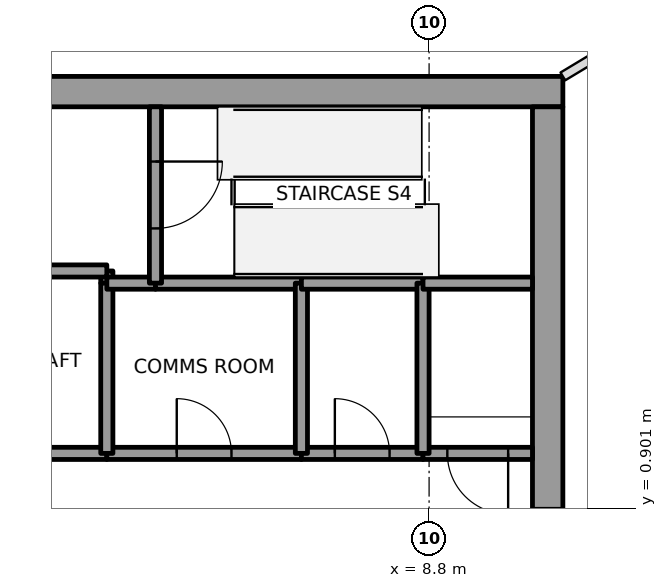
"""IFC4 building model, lengths in metres.
Left out: names, types, materials, properties, quantities, classifications, styles, units other than length and angle.
Written with IfcOpenShell. Run it as: python <this file> out.ifc"""

import sys

from ifc_helpers import new_model, si_unit, direction, frame, frame_2d, origin, place, context, subcontext, project, spatial, rectangle, extrude, element, fill, save


model = new_model("IFC4")
c1 = context("Model", 3, precision=1e-05, world=origin(), true_north=direction((0.0, 1.0)))
c2 = subcontext(c1, "Body", "Model", "MODEL_VIEW")
j1 = project(units=[si_unit("LENGTHUNIT", "METRE"), si_unit("PLANEANGLEUNIT", "RADIAN")], contexts=[c1])
p1 = place(None, origin())
s1 = spatial("IfcSite", under=j1, at=p1, CompositionType="ELEMENT")
p2 = place(p1, origin())
s2 = spatial("IfcBuilding", under=s1, at=p2, CompositionType="ELEMENT")
p3 = place(p2, frame((0.0, 0.0, 291.0)))
s3 = spatial("IfcBuildingStorey", under=s2, at=p3, CompositionType="ELEMENT", Elevation=291.0)
p4 = place(p3, frame((-11.0, 7.75, 0.0), z_axis=(0.0, 0.0, 1.0), x_axis=(1.0, 0.0, 0.0)))
e1 = element("IfcWall", 1, at=p4, inside=s3, PredefinedType="SHEAR", context=c2, shape_type="SweptSolid", body=[
    extrude(rectangle(XDim=22.0, YDim=0.5, at=frame_2d((11.0, 0.0))), origin(), (0.0, 0.0, 1.0), 4.0),
])
p5 = place(p4, frame((10.45, 0.0, 0.0)))
e2 = element("IfcOpeningElement", 2, at=p5, cuts=e1, PredefinedType="OPENING", context=c2, shape_type="SweptSolid", body=[
    extrude(rectangle(XDim=1.1, YDim=2.1, at=frame_2d((0.55, 1.05))), frame((0.0, 0.25, 0.0), z_axis=(0.0, -1.0, 0.0), x_axis=(1.0, 0.0, 0.0)), (0.0, 0.0, 1.0), 0.5),
])
p6 = place(p3, frame((10.75, -7.5, 0.0), z_axis=(0.0, 0.0, 1.0), x_axis=(0.0, 1.0, 0.0)))
e3 = element("IfcWall", 3, at=p6, inside=s3, PredefinedType="SHEAR", context=c2, shape_type="SweptSolid", body=[
    extrude(rectangle(XDim=15.0, YDim=0.5, at=frame_2d((7.5, 0.0))), origin(), (0.0, 0.0, 1.0), 4.0),
])
p7 = place(p6, frame((6.6, 0.0, 0.0)))
e4 = element("IfcOpeningElement", 4, at=p7, cuts=e3, PredefinedType="OPENING", context=c2, shape_type="SweptSolid", body=[
    extrude(rectangle(XDim=1.8, YDim=2.1, at=frame_2d((0.9, 1.05))), frame((0.0, 0.25, 0.0), z_axis=(0.0, -1.0, 0.0), x_axis=(1.0, 0.0, 0.0)), (0.0, 0.0, 1.0), 0.5),
])
p8 = place(p3, frame((12.153, 7.96, 0.0), z_axis=(0.0, 0.0, 1.0), x_axis=(-0.523170739685, 0.852227890378, 0.0)))
e5 = element("IfcWall", 5, at=p8, inside=s3, PredefinedType="SOLIDWALL", context=c2, shape_type="SweptSolid", body=[
    extrude(rectangle(XDim=3.808, YDim=0.2, at=frame_2d((1.904, 0.0))), origin(), (0.0, 0.0, 1.0), 3.34),
])
p9 = place(p8, frame((1.354, 0.0, 0.0)))
e6 = element("IfcOpeningElement", 6, at=p9, cuts=e5, PredefinedType="OPENING", context=c2, shape_type="SweptSolid", body=[
    extrude(rectangle(XDim=1.1, YDim=2.1, at=frame_2d((0.55, 1.05))), frame((0.0, 0.1, 0.0), z_axis=(0.0, -1.0, 0.0), x_axis=(1.0, 0.0, 0.0)), (0.0, 0.0, 1.0), 0.2),
])
p10 = place(p3, frame((3.5, 1.8, 0.0), z_axis=(0.0, 0.0, 1.0), x_axis=(-1.0, 0.0, 0.0)))
e7 = element("IfcWall", 7, at=p10, inside=s3, PredefinedType="SOLIDWALL", context=c2, shape_type="SweptSolid", body=[
    extrude(rectangle(XDim=2.6, YDim=0.2, at=frame_2d((1.3, 0.0))), origin(), (0.0, 0.0, 1.0), 3.85),
])
p11 = place(p3, frame((3.5, 4.6, 0.0), z_axis=(0.0, 0.0, 1.0), x_axis=(0.0, 1.0, 0.0)))
e8 = element("IfcWall", 8, at=p11, inside=s3, PredefinedType="SOLIDWALL", context=c2, shape_type="SweptSolid", body=[
    extrude(rectangle(XDim=0.2, YDim=0.2, at=frame_2d((0.1, 0.0))), origin(), (0.0, 0.0, 1.0), 3.85),
])
p12 = place(p3, frame((3.5, 4.8, 0.0), z_axis=(0.0, 0.0, 1.0), x_axis=(-1.0, 0.0, 0.0)))
e9 = element("IfcWall", 9, at=p12, inside=s3, PredefinedType="SOLIDWALL", context=c2, shape_type="SweptSolid", body=[
    extrude(rectangle(XDim=2.6, YDim=0.2, at=frame_2d((1.3, 0.0))), origin(), (0.0, 0.0, 1.0), 3.85),
])
p13 = place(p3, frame((3.5, 1.8, 0.0), z_axis=(0.0, 0.0, 1.0), x_axis=(1.0, 0.0, 0.0)))
e10 = element("IfcWall", 10, at=p13, inside=s3, PredefinedType="SOLIDWALL", context=c2, shape_type="SweptSolid", body=[
    extrude(rectangle(XDim=3.2, YDim=0.2, at=frame_2d((1.6, 0.0))), origin(), (0.0, 0.0, 1.0), 3.85),
])
p14 = place(p13, frame((1.15, 0.0, 0.0)))
e11 = element("IfcOpeningElement", 11, at=p14, cuts=e10, PredefinedType="OPENING", context=c2, shape_type="SweptSolid", body=[
    extrude(rectangle(XDim=0.9, YDim=2.1, at=frame_2d((0.45, 1.05))), frame((0.0, 0.1, 0.0), z_axis=(0.0, -1.0, 0.0), x_axis=(1.0, 0.0, 0.0)), (0.0, 0.0, 1.0), 0.2),
])
p15 = place(p3, frame((3.5, 4.6, 0.0), z_axis=(0.0, 0.0, 1.0), x_axis=(0.0, -1.0, 0.0)))
e12 = element("IfcWall", 12, at=p15, inside=s3, PredefinedType="SOLIDWALL", context=c2, shape_type="SweptSolid", body=[
    extrude(rectangle(XDim=2.8, YDim=0.2, at=frame_2d((1.4, 0.0))), origin(), (0.0, 0.0, 1.0), 3.85),
])
p16 = place(p3, frame((4.3, 4.6, 0.0), z_axis=(0.0, 0.0, 1.0), x_axis=(-1.0, 0.0, 0.0)))
e13 = element("IfcWall", 13, at=p16, inside=s3, PredefinedType="SOLIDWALL", context=c2, shape_type="SweptSolid", body=[
    extrude(rectangle(XDim=0.8, YDim=0.2, at=frame_2d((0.4, 0.0))), origin(), (0.0, 0.0, 1.0), 3.85),
])
p17 = place(p3, frame((6.7, 4.6, 0.0), z_axis=(0.0, 0.0, 1.0), x_axis=(-1.0, 0.0, 0.0)))
e14 = element("IfcWall", 14, at=p17, inside=s3, PredefinedType="SOLIDWALL", context=c2, shape_type="SweptSolid", body=[
    extrude(rectangle(XDim=2.4, YDim=0.2, at=frame_2d((1.2, 0.0))), origin(), (0.0, 0.0, 1.0), 3.85),
])
p18 = place(p3, frame((4.3, 7.5, 0.0), z_axis=(0.0, 0.0, 1.0), x_axis=(0.0, -1.0, 0.0)))
e15 = element("IfcWall", 15, at=p18, inside=s3, PredefinedType="SOLIDWALL", context=c2, shape_type="SweptSolid", body=[
    extrude(rectangle(XDim=2.9, YDim=0.2, at=frame_2d((1.45, 0.0))), origin(), (0.0, 0.0, 1.0), 3.85),
])
p19 = place(p18, frame((0.9, 0.0, 0.0)))
e16 = element("IfcOpeningElement", 16, at=p19, cuts=e15, PredefinedType="OPENING", context=c2, shape_type="SweptSolid", body=[
    extrude(rectangle(XDim=1.1, YDim=2.1, at=frame_2d((0.55, 1.05))), frame((0.0, 0.1, 0.0), z_axis=(0.0, -1.0, 0.0), x_axis=(1.0, 0.0, 0.0)), (0.0, 0.0, 1.0), 0.2),
])
p20 = place(p3, frame((6.7, 1.8, 0.0), z_axis=(0.0, 0.0, 1.0), x_axis=(1.0, 0.0, 0.0)))
e17 = element("IfcWall", 17, at=p20, inside=s3, PredefinedType="SOLIDWALL", context=c2, shape_type="SweptSolid", body=[
    extrude(rectangle(XDim=2.0, YDim=0.2, at=frame_2d((1.0, 0.0))), origin(), (0.0, 0.0, 1.0), 3.85),
])
p21 = place(p20, frame((0.55, 0.0, 0.0)))
e18 = element("IfcOpeningElement", 18, at=p21, cuts=e17, PredefinedType="OPENING", context=c2, shape_type="SweptSolid", body=[
    extrude(rectangle(XDim=0.9, YDim=2.1, at=frame_2d((0.45, 1.05))), frame((0.0, 0.1, 0.0), z_axis=(0.0, -1.0, 0.0), x_axis=(1.0, 0.0, 0.0)), (0.0, 0.0, 1.0), 0.2),
])
p22 = place(p3, frame((6.7, 1.8, 0.0), z_axis=(0.0, 0.0, 1.0), x_axis=(0.0, 1.0, 0.0)))
e19 = element("IfcWall", 19, at=p22, inside=s3, PredefinedType="SOLIDWALL", context=c2, shape_type="SweptSolid", body=[
    extrude(rectangle(XDim=2.8, YDim=0.2, at=frame_2d((1.4, 0.0))), origin(), (0.0, 0.0, 1.0), 3.85),
])
p23 = place(p3, frame((8.7, 4.6, 0.0), z_axis=(0.0, 0.0, 1.0), x_axis=(-1.0, 0.0, 0.0)))
e20 = element("IfcWall", 20, at=p23, inside=s3, PredefinedType="SOLIDWALL", context=c2, shape_type="SweptSolid", body=[
    extrude(rectangle(XDim=2.0, YDim=0.2, at=frame_2d((1.0, 0.0))), origin(), (0.0, 0.0, 1.0), 3.85),
])
p24 = place(p3, frame((10.5, 1.8, 0.0), z_axis=(0.0, 0.0, 1.0), x_axis=(-1.0, 0.0, 0.0)))
e21 = element("IfcWall", 21, at=p24, inside=s3, PredefinedType="SOLIDWALL", context=c2, shape_type="SweptSolid", body=[
    extrude(rectangle(XDim=1.8, YDim=0.2, at=frame_2d((0.9, 0.0))), origin(), (0.0, 0.0, 1.0), 3.85),
])
p25 = place(p24, frame((0.4, 0.0, 0.0)))
e22 = element("IfcOpeningElement", 22, at=p25, cuts=e21, PredefinedType="OPENING", context=c2, shape_type="SweptSolid", body=[
    extrude(rectangle(XDim=1.0, YDim=2.1, at=frame_2d((0.5, 1.05))), frame((0.0, 0.1, 0.0), z_axis=(0.0, -1.0, 0.0), x_axis=(1.0, 0.0, 0.0)), (0.0, 0.0, 1.0), 0.2),
])
p26 = place(p3, frame((8.7, 1.8, 0.0), z_axis=(0.0, 0.0, 1.0), x_axis=(0.0, 1.0, 0.0)))
e23 = element("IfcWall", 23, at=p26, inside=s3, PredefinedType="SOLIDWALL", context=c2, shape_type="SweptSolid", body=[
    extrude(rectangle(XDim=2.8, YDim=0.2, at=frame_2d((1.4, 0.0))), origin(), (0.0, 0.0, 1.0), 3.85),
])
p27 = place(p3, frame((10.5, 4.6, 0.0), z_axis=(0.0, 0.0, 1.0), x_axis=(-1.0, 0.0, 0.0)))
e24 = element("IfcWall", 24, at=p27, inside=s3, PredefinedType="SOLIDWALL", context=c2, shape_type="SweptSolid", body=[
    extrude(rectangle(XDim=1.8, YDim=0.2, at=frame_2d((0.9, 0.0))), origin(), (0.0, 0.0, 1.0), 3.85),
])
p28 = place(p3, frame((11.0, 8.0, 0.0), z_axis=(0.0, 0.0, 1.0), x_axis=(0.856868556797, 0.515534941951, 0.0)))
e25 = element("IfcWall", 25, at=p28, inside=s3, PredefinedType="PARTITIONING", context=c2, shape_type="SweptSolid", body=[
    extrude(rectangle(XDim=0.967, YDim=0.15, at=frame_2d((0.483, 0.0))), origin(), (0.0, 0.0, 1.0), 3.45),
])
p29 = place(p25, origin())
e26 = element("IfcDoor", 26, at=p29, inside=s3, OperationType="SINGLE_SWING_RIGHT", PredefinedType="DOOR", context=c2, shape_type="SweptSolid", body=[
    extrude(rectangle(XDim=1.0, YDim=2.1, at=frame_2d((0.5, 1.05))), frame((0.0, 0.025, 0.0), z_axis=(0.0, -1.0, 0.0), x_axis=(1.0, 0.0, 0.0)), (0.0, 0.0, 1.0), 0.05),
])
fill(e22, e26)
p30 = place(p19, origin())
e27 = element("IfcDoor", 27, at=p30, inside=s3, OperationType="SINGLE_SWING_LEFT", PredefinedType="DOOR", context=c2, shape_type="SweptSolid", body=[
    extrude(rectangle(XDim=1.1, YDim=2.1, at=frame_2d((0.55, 1.05))), frame((0.0, 0.025, 0.0), z_axis=(0.0, -1.0, 0.0), x_axis=(1.0, 0.0, 0.0)), (0.0, 0.0, 1.0), 0.05),
])
fill(e16, e27)
p31 = place(p14, origin())
e28 = element("IfcDoor", 28, at=p31, inside=s3, OperationType="SINGLE_SWING_LEFT", PredefinedType="DOOR", context=c2, shape_type="SweptSolid", body=[
    extrude(rectangle(XDim=0.9, YDim=2.1, at=frame_2d((0.45, 1.05))), frame((0.0, 0.025, 0.0), z_axis=(0.0, -1.0, 0.0), x_axis=(1.0, 0.0, 0.0)), (0.0, 0.0, 1.0), 0.05),
])
fill(e11, e28)
p32 = place(p21, origin())
e29 = element("IfcDoor", 29, at=p32, inside=s3, OperationType="SINGLE_SWING_LEFT", PredefinedType="DOOR", context=c2, shape_type="SweptSolid", body=[
    extrude(rectangle(XDim=0.9, YDim=2.1, at=frame_2d((0.45, 1.05))), frame((0.0, 0.025, 0.0), z_axis=(0.0, -1.0, 0.0), x_axis=(1.0, 0.0, 0.0)), (0.0, 0.0, 1.0), 0.05),
])
fill(e18, e29)
p33 = place(p7, origin())
e30 = element("IfcDoor", 30, at=p33, inside=s3, OperationType="DOUBLE_DOOR_SINGLE_SWING", PredefinedType="DOOR", context=c2, shape_type="SweptSolid", body=[
    extrude(rectangle(XDim=1.8, YDim=2.1, at=frame_2d((0.9, 1.05))), frame((0.0, 0.025, 0.0), z_axis=(0.0, -1.0, 0.0), x_axis=(1.0, 0.0, 0.0)), (0.0, 0.0, 1.0), 0.05),
])
fill(e4, e30)
save(model, sys.argv[1])
